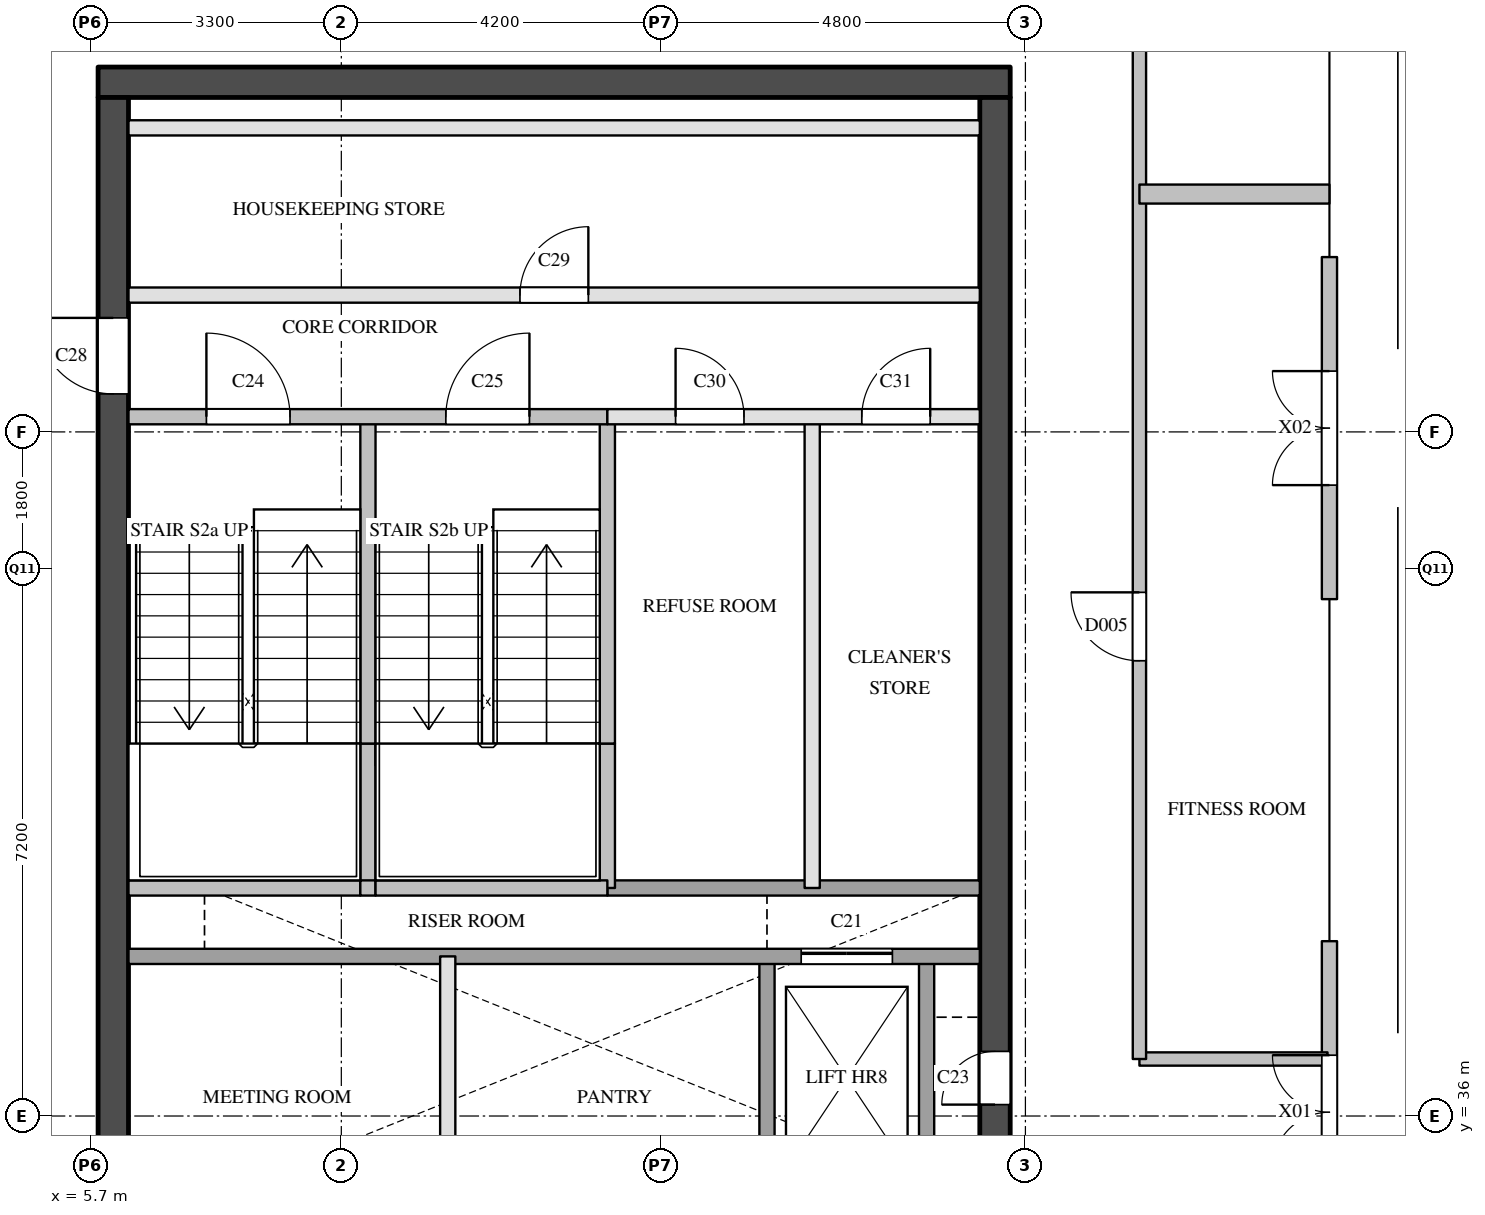
"""IFC4 building model, lengths in metres.
Left out: names, types, materials, properties, quantities, classifications, styles, units other than length and angle.
Written with IfcOpenShell. Run it as: python <this file> out.ifc"""

import sys

from ifc_helpers import new_model, si_unit, direction, frame, frame_2d, origin, place, context, subcontext, project, spatial, rectangle, extrude, element, fill, save


model = new_model("IFC4")
c1 = context("Model", 3, precision=1e-05, world=origin(), true_north=direction((0.0, 1.0)))
c2 = subcontext(c1, "Body", "Model", "MODEL_VIEW")
j1 = project(units=[si_unit("LENGTHUNIT", "METRE"), si_unit("PLANEANGLEUNIT", "RADIAN")], contexts=[c1])
p1 = place(None, origin())
s1 = spatial("IfcSite", under=j1, at=p1, CompositionType="ELEMENT")
p2 = place(p1, origin())
s2 = spatial("IfcBuilding", under=s1, at=p2, CompositionType="ELEMENT")
p3 = place(p2, frame((0.0, 0.0, 203.3)))
s3 = spatial("IfcBuildingStorey", under=s2, at=p3, CompositionType="ELEMENT", Elevation=203.3)
p4 = place(p3, frame((22.0, 33.8, 0.0), z_axis=(0.0, 0.0, 1.0), x_axis=(0.0, 1.0, 0.0)))
e1 = element("IfcWall", 1, at=p4, inside=s3, PredefinedType="SOLIDWALL", context=c2, shape_type="SweptSolid", body=[
    extrude(rectangle(XDim=4.5, YDim=0.2, at=frame_2d((2.25, 0.0))), origin(), (0.0, 0.0, 1.0), 2.6),
])
p5 = place(p4, frame((1.5, 0.0, 0.0)))
e2 = element("IfcOpeningElement", 2, at=p5, cuts=e1, PredefinedType="OPENING", context=c2, shape_type="SweptSolid", body=[
    extrude(rectangle(XDim=1.5, YDim=2.1, at=frame_2d((0.75, 1.05))), frame((0.0, 0.11, 0.0), z_axis=(0.0, -1.0, 0.0), x_axis=(1.0, 0.0, 0.0)), (0.0, 0.0, 1.0), 0.22),
])
p6 = place(p3, frame((22.0, 42.8, 0.0), z_axis=(0.0, 0.0, 1.0), x_axis=(0.0, 1.0, 0.0)))
e3 = element("IfcWall", 3, at=p6, inside=s3, PredefinedType="SOLIDWALL", context=c2, shape_type="SweptSolid", body=[
    extrude(rectangle(XDim=4.5, YDim=0.2, at=frame_2d((2.25, 0.0))), origin(), (0.0, 0.0, 1.0), 2.6),
])
p7 = place(p6, frame((1.5, 0.0, 0.0)))
e4 = element("IfcOpeningElement", 4, at=p7, cuts=e3, PredefinedType="OPENING", context=c2, shape_type="SweptSolid", body=[
    extrude(rectangle(XDim=1.5, YDim=2.1, at=frame_2d((0.75, 1.05))), frame((0.0, 0.11, 0.0), z_axis=(0.0, -1.0, 0.0), x_axis=(1.0, 0.0, 0.0)), (0.0, 0.0, 1.0), 0.22),
])
p8 = place(p3, frame((5.8, 49.6, 0.0), z_axis=(0.0, 0.0, 1.0), x_axis=(1.0, 0.0, 0.0)))
e5 = element("IfcWall", 5, at=p8, inside=s3, PredefinedType="SHEAR", context=c2, shape_type="SweptSolid", body=[
    extrude(rectangle(XDim=12.0, YDim=0.4, at=frame_2d((6.0, 0.0))), origin(), (0.0, 0.0, 1.0), 3.6),
])
p9 = place(p3, frame((6.0, 29.1, 0.0), z_axis=(0.0, 0.0, 1.0), x_axis=(0.0, 1.0, 0.0)))
e6 = element("IfcWall", 6, at=p9, inside=s3, PredefinedType="SHEAR", context=c2, shape_type="SweptSolid", body=[
    extrude(rectangle(XDim=20.3, YDim=0.4, at=frame_2d((10.15, 0.0))), origin(), (0.0, 0.0, 1.0), 3.6),
])
p10 = place(p9, frame((3.45, 0.0, 0.0)))
e7 = element("IfcOpeningElement", 7, at=p10, cuts=e6, PredefinedType="OPENING", context=c2, shape_type="SweptSolid", body=[
    extrude(rectangle(XDim=1.0, YDim=2.1, at=frame_2d((0.5, 1.05))), frame((0.0, 0.21, 0.0), z_axis=(0.0, -1.0, 0.0), x_axis=(1.0, 0.0, 0.0)), (0.0, 0.0, 1.0), 0.42),
])
p11 = place(p9, frame((16.4, 0.0, 0.0)))
e8 = element("IfcOpeningElement", 8, at=p11, cuts=e6, PredefinedType="OPENING", context=c2, shape_type="SweptSolid", body=[
    extrude(rectangle(XDim=1.0, YDim=2.1, at=frame_2d((0.5, 1.05))), frame((0.0, 0.21, 0.0), z_axis=(0.0, -1.0, 0.0), x_axis=(1.0, 0.0, 0.0)), (0.0, 0.0, 1.0), 0.42),
])
p12 = place(p3, frame((17.6, 29.1, 0.0), z_axis=(0.0, 0.0, 1.0), x_axis=(0.0, 1.0, 0.0)))
e9 = element("IfcWall", 9, at=p12, inside=s3, PredefinedType="SHEAR", context=c2, shape_type="SweptSolid", body=[
    extrude(rectangle(XDim=20.3, YDim=0.4, at=frame_2d((10.15, 0.0))), origin(), (0.0, 0.0, 1.0), 3.6),
])
p13 = place(p12, frame((1.25, 0.0, 0.0)))
e10 = element("IfcOpeningElement", 10, at=p13, cuts=e9, PredefinedType="OPENING", context=c2, shape_type="SweptSolid", body=[
    extrude(rectangle(XDim=0.7, YDim=2.1, at=frame_2d((0.35, 1.05))), frame((0.0, 0.21, 0.0), z_axis=(0.0, -1.0, 0.0), x_axis=(1.0, 0.0, 0.0)), (0.0, 0.0, 1.0), 0.42),
])
p14 = place(p12, frame((7.05, 0.0, 0.0)))
e11 = element("IfcOpeningElement", 11, at=p14, cuts=e9, PredefinedType="OPENING", context=c2, shape_type="SweptSolid", body=[
    extrude(rectangle(XDim=0.7, YDim=2.1, at=frame_2d((0.35, 1.05))), frame((0.0, 0.21, 0.0), z_axis=(0.0, -1.0, 0.0), x_axis=(1.0, 0.0, 0.0)), (0.0, 0.0, 1.0), 0.42),
])
p15 = place(p12, frame((3.6, 0.0, 0.0)))
e12 = element("IfcOpeningElement", 12, at=p15, cuts=e9, PredefinedType="OPENING", context=c2, shape_type="SweptSolid", body=[
    extrude(rectangle(XDim=1.8, YDim=2.1, at=frame_2d((0.9, 1.05))), frame((0.0, 0.21, 0.0), z_axis=(0.0, -1.0, 0.0), x_axis=(1.0, 0.0, 0.0)), (0.0, 0.0, 1.0), 0.42),
])
p16 = place(p3, frame((9.35, 39.0, 0.0), z_axis=(0.0, 0.0, 1.0), x_axis=(0.0, 1.0, 0.0)))
e13 = element("IfcWall", 13, at=p16, inside=s3, PredefinedType="SOLIDWALL", context=c2, shape_type="SweptSolid", body=[
    extrude(rectangle(XDim=1.9, YDim=0.2, at=frame_2d((0.95, 0.0))), origin(), (0.0, 0.0, 1.0), 3.6),
])
p17 = place(p3, frame((9.35, 40.9, 0.0), z_axis=(0.0, 0.0, 1.0), x_axis=(0.0, 1.0, 0.0)))
e14 = element("IfcWall", 14, at=p17, inside=s3, PredefinedType="SOLIDWALL", context=c2, shape_type="SweptSolid", body=[
    extrude(rectangle(XDim=4.3, YDim=0.2, at=frame_2d((2.15, 0.0))), origin(), (0.0, 0.0, 1.0), 3.6),
])
p18 = place(p3, frame((10.4, 33.8, 0.0), z_axis=(0.0, 0.0, 1.0), x_axis=(0.0, 1.0, 0.0)))
e15 = element("IfcWall", 15, at=p18, inside=s3, PredefinedType="PARTITIONING", context=c2, shape_type="SweptSolid", body=[
    extrude(rectangle(XDim=4.3, YDim=0.2, at=frame_2d((2.15, 0.0))), origin(), (0.0, 0.0, 1.0), 3.6),
])
p19 = place(p3, frame((12.5, 39.0, 0.0), z_axis=(0.0, 0.0, 1.0), x_axis=(0.0, 1.0, 0.0)))
e16 = element("IfcWall", 16, at=p19, inside=s3, PredefinedType="SOLIDWALL", context=c2, shape_type="SweptSolid", body=[
    extrude(rectangle(XDim=1.9, YDim=0.2, at=frame_2d((0.95, 0.0))), origin(), (0.0, 0.0, 1.0), 3.6),
])
p20 = place(p3, frame((12.5, 40.9, 0.0), z_axis=(0.0, 0.0, 1.0), x_axis=(0.0, 1.0, 0.0)))
e17 = element("IfcWall", 17, at=p20, inside=s3, PredefinedType="SOLIDWALL", context=c2, shape_type="SweptSolid", body=[
    extrude(rectangle(XDim=4.3, YDim=0.2, at=frame_2d((2.15, 0.0))), origin(), (0.0, 0.0, 1.0), 3.6),
])
p21 = place(p3, frame((14.6, 34.9, 0.0), z_axis=(0.0, 0.0, 1.0), x_axis=(0.0, 1.0, 0.0)))
e18 = element("IfcWall", 18, at=p21, inside=s3, PredefinedType="SOLIDWALL", context=c2, shape_type="SweptSolid", body=[
    extrude(rectangle(XDim=3.2, YDim=0.2, at=frame_2d((1.6, 0.0))), origin(), (0.0, 0.0, 1.0), 3.6),
])
p22 = place(p3, frame((15.195, 39.0, 0.0), z_axis=(0.0, 0.0, 1.0), x_axis=(0.0, 1.0, 0.0)))
e19 = element("IfcWall", 19, at=p22, inside=s3, PredefinedType="PARTITIONING", context=c2, shape_type="SweptSolid", body=[
    extrude(rectangle(XDim=6.2, YDim=0.2, at=frame_2d((3.1, 0.0))), origin(), (0.0, 0.0, 1.0), 3.6),
])
p23 = place(p3, frame((16.7, 34.9, 0.0), z_axis=(0.0, 0.0, 1.0), x_axis=(0.0, 1.0, 0.0)))
e20 = element("IfcWall", 20, at=p23, inside=s3, PredefinedType="SOLIDWALL", context=c2, shape_type="SweptSolid", body=[
    extrude(rectangle(XDim=3.2, YDim=0.2, at=frame_2d((1.6, 0.0))), origin(), (0.0, 0.0, 1.0), 3.6),
])
p24 = place(p3, frame((6.2, 38.1, 0.0), z_axis=(0.0, 0.0, 1.0), x_axis=(1.0, 0.0, 0.0)))
e21 = element("IfcWall", 21, at=p24, inside=s3, PredefinedType="SOLIDWALL", context=c2, shape_type="SweptSolid", body=[
    extrude(rectangle(XDim=11.2, YDim=0.2, at=frame_2d((5.6, 0.0))), origin(), (0.0, 0.0, 1.0), 3.6),
])
p25 = place(p24, frame((8.85, 0.0, 0.0)))
e22 = element("IfcOpeningElement", 22, at=p25, cuts=e21, PredefinedType="OPENING", context=c2, shape_type="SweptSolid", body=[
    extrude(rectangle(XDim=1.2, YDim=2.1, at=frame_2d((0.6, 1.05))), frame((0.0, 0.11, 0.0), z_axis=(0.0, -1.0, 0.0), x_axis=(1.0, 0.0, 0.0)), (0.0, 0.0, 1.0), 0.22),
])
p26 = place(p3, frame((12.5, 39.0, 0.0), z_axis=(0.0, 0.0, 1.0), x_axis=(1.0, 0.0, 0.0)))
e23 = element("IfcWall", 23, at=p26, inside=s3, PredefinedType="SOLIDWALL", context=c2, shape_type="SweptSolid", body=[
    extrude(rectangle(XDim=4.9, YDim=0.2, at=frame_2d((2.45, 0.0))), origin(), (0.0, 0.0, 1.0), 3.6),
])
p27 = place(p3, frame((6.2, 39.0, 0.0), z_axis=(0.0, 0.0, 1.0), x_axis=(1.0, 0.0, 0.0)))
e24 = element("IfcWall", 24, at=p27, inside=s3, PredefinedType="SOLIDWALL", context=c2, shape_type="SweptSolid", body=[
    extrude(rectangle(XDim=3.05, YDim=0.2, at=frame_2d((1.525, 0.0))), origin(), (0.0, 0.0, 1.0), 3.6),
])
p28 = place(p3, frame((9.25, 39.0, 0.0), z_axis=(0.0, 0.0, 1.0), x_axis=(1.0, 0.0, 0.0)))
e25 = element("IfcWall", 25, at=p28, inside=s3, PredefinedType="SOLIDWALL", context=c2, shape_type="SweptSolid", body=[
    extrude(rectangle(XDim=0.2, YDim=0.2, at=frame_2d((0.1, 0.0))), origin(), (0.0, 0.0, 1.0), 3.6),
])
p29 = place(p3, frame((9.45, 39.0, 0.0), z_axis=(0.0, 0.0, 1.0), x_axis=(1.0, 0.0, 0.0)))
e26 = element("IfcWall", 26, at=p29, inside=s3, PredefinedType="SOLIDWALL", context=c2, shape_type="SweptSolid", body=[
    extrude(rectangle(XDim=3.05, YDim=0.2, at=frame_2d((1.525, 0.0))), origin(), (0.0, 0.0, 1.0), 3.6),
])
p30 = place(p3, frame((12.5, 45.2, 0.0), z_axis=(0.0, 0.0, 1.0), x_axis=(1.0, 0.0, 0.0)))
e27 = element("IfcWall", 27, at=p30, inside=s3, PredefinedType="PARTITIONING", context=c2, shape_type="SweptSolid", body=[
    extrude(rectangle(XDim=4.9, YDim=0.2, at=frame_2d((2.45, 0.0))), origin(), (0.0, 0.0, 1.0), 3.6),
])
p31 = place(p30, frame((0.897, 0.0, 0.0)))
e28 = element("IfcOpeningElement", 28, at=p31, cuts=e27, PredefinedType="OPENING", context=c2, shape_type="SweptSolid", body=[
    extrude(rectangle(XDim=0.9, YDim=2.1, at=frame_2d((0.45, 1.05))), frame((0.0, 0.11, 0.0), z_axis=(0.0, -1.0, 0.0), x_axis=(1.0, 0.0, 0.0)), (0.0, 0.0, 1.0), 0.22),
])
p32 = place(p30, frame((3.347, 0.0, 0.0)))
e29 = element("IfcOpeningElement", 29, at=p32, cuts=e27, PredefinedType="OPENING", context=c2, shape_type="SweptSolid", body=[
    extrude(rectangle(XDim=0.9, YDim=2.1, at=frame_2d((0.45, 1.05))), frame((0.0, 0.11, 0.0), z_axis=(0.0, -1.0, 0.0), x_axis=(1.0, 0.0, 0.0)), (0.0, 0.0, 1.0), 0.22),
])
p33 = place(p3, frame((6.2, 45.2, 0.0), z_axis=(0.0, 0.0, 1.0), x_axis=(1.0, 0.0, 0.0)))
e30 = element("IfcWall", 30, at=p33, inside=s3, PredefinedType="SOLIDWALL", context=c2, shape_type="SweptSolid", body=[
    extrude(rectangle(XDim=6.3, YDim=0.2, at=frame_2d((3.15, 0.0))), origin(), (0.0, 0.0, 1.0), 3.6),
])
p34 = place(p33, frame((1.025, 0.0, 0.0)))
e31 = element("IfcOpeningElement", 31, at=p34, cuts=e30, PredefinedType="OPENING", context=c2, shape_type="SweptSolid", body=[
    extrude(rectangle(XDim=1.1, YDim=2.1, at=frame_2d((0.55, 1.05))), frame((0.0, 0.11, 0.0), z_axis=(0.0, -1.0, 0.0), x_axis=(1.0, 0.0, 0.0)), (0.0, 0.0, 1.0), 0.22),
])
p35 = place(p33, frame((4.175, 0.0, 0.0)))
e32 = element("IfcOpeningElement", 32, at=p35, cuts=e30, PredefinedType="OPENING", context=c2, shape_type="SweptSolid", body=[
    extrude(rectangle(XDim=1.1, YDim=2.1, at=frame_2d((0.55, 1.05))), frame((0.0, 0.11, 0.0), z_axis=(0.0, -1.0, 0.0), x_axis=(1.0, 0.0, 0.0)), (0.0, 0.0, 1.0), 0.22),
])
p36 = place(p3, frame((6.2, 46.8, 0.0), z_axis=(0.0, 0.0, 1.0), x_axis=(1.0, 0.0, 0.0)))
e33 = element("IfcWall", 33, at=p36, inside=s3, PredefinedType="PARTITIONING", context=c2, shape_type="SweptSolid", body=[
    extrude(rectangle(XDim=11.2, YDim=0.2, at=frame_2d((5.6, 0.0))), origin(), (0.0, 0.0, 1.0), 3.6),
])
p37 = place(p36, frame((5.15, 0.0, 0.0)))
e34 = element("IfcOpeningElement", 34, at=p37, cuts=e33, PredefinedType="OPENING", context=c2, shape_type="SweptSolid", body=[
    extrude(rectangle(XDim=0.9, YDim=2.1, at=frame_2d((0.45, 1.05))), frame((0.0, 0.11, 0.0), z_axis=(0.0, -1.0, 0.0), x_axis=(1.0, 0.0, 0.0)), (0.0, 0.0, 1.0), 0.22),
])
p38 = place(p3, frame((6.2, 49.0, 0.0), z_axis=(0.0, 0.0, 1.0), x_axis=(1.0, 0.0, 0.0)))
e35 = element("IfcWall", 35, at=p38, inside=s3, PredefinedType="PARTITIONING", context=c2, shape_type="SweptSolid", body=[
    extrude(rectangle(XDim=11.2, YDim=0.2, at=frame_2d((5.6, 0.0))), origin(), (0.0, 0.0, 1.0), 3.6),
])
p39 = place(p3, frame((19.5, 36.75, 0.0), z_axis=(0.0, 0.0, 1.0), x_axis=(1.0, 0.0, 0.0)))
e36 = element("IfcWall", 36, at=p39, inside=s3, PredefinedType="PARTITIONING", context=c2, shape_type="SweptSolid", body=[
    extrude(rectangle(XDim=2.475, YDim=0.175, at=frame_2d((1.237, 0.0))), origin(), (0.0, 0.0, 1.0), 3.6),
])
p40 = place(p3, frame((19.5, 36.75, 0.0), z_axis=(0.0, 0.0, 1.0), x_axis=(0.0, 1.0, 0.0)))
e37 = element("IfcWall", 37, at=p40, inside=s3, PredefinedType="PARTITIONING", context=c2, shape_type="SweptSolid", body=[
    extrude(rectangle(XDim=14.75, YDim=0.175, at=frame_2d((7.375, 0.0))), origin(), (0.0, 0.0, 1.0), 3.6),
])
p41 = place(p40, frame((5.239, 0.0, 0.0)))
e38 = element("IfcOpeningElement", 38, at=p41, cuts=e37, PredefinedType="OPENING", context=c2, shape_type="SweptSolid", body=[
    extrude(rectangle(XDim=0.9, YDim=2.1, at=frame_2d((0.45, 1.05))), frame((0.0, 0.097, 0.0), z_axis=(0.0, -1.0, 0.0), x_axis=(1.0, 0.0, 0.0)), (0.0, 0.0, 1.0), 0.195),
])
p42 = place(p3, frame((19.5, 48.129, 0.0), z_axis=(0.0, 0.0, 1.0), x_axis=(1.0, 0.0, 0.0)))
e39 = element("IfcWall", 39, at=p42, inside=s3, PredefinedType="PARTITIONING", context=c2, shape_type="SweptSolid", body=[
    extrude(rectangle(XDim=2.5, YDim=0.25, at=frame_2d((1.25, 0.0))), origin(), (0.0, 0.0, 1.0), 3.6),
])
p43 = place(p5, origin())
e40 = element("IfcDoor", 40, at=p43, inside=s3, OperationType="DOUBLE_DOOR_SINGLE_SWING", PredefinedType="DOOR", context=c2, shape_type="SweptSolid", body=[
    extrude(rectangle(XDim=1.5, YDim=2.1, at=frame_2d((0.75, 1.05))), frame((0.0, 0.025, 0.0), z_axis=(0.0, -1.0, 0.0), x_axis=(1.0, 0.0, 0.0)), (0.0, 0.0, 1.0), 0.05),
])
fill(e2, e40)
p44 = place(p7, origin())
e41 = element("IfcDoor", 41, at=p44, inside=s3, OperationType="DOUBLE_DOOR_SINGLE_SWING", PredefinedType="DOOR", context=c2, shape_type="SweptSolid", body=[
    extrude(rectangle(XDim=1.5, YDim=2.1, at=frame_2d((0.75, 1.05))), frame((0.0, 0.025, 0.0), z_axis=(0.0, -1.0, 0.0), x_axis=(1.0, 0.0, 0.0)), (0.0, 0.0, 1.0), 0.05),
])
fill(e4, e41)
p45 = place(p25, origin())
e42 = element("IfcDoor", 42, at=p45, inside=s3, OperationType="SLIDING_TO_LEFT", PredefinedType="DOOR", context=c2, shape_type="SweptSolid", body=[
    extrude(rectangle(XDim=1.2, YDim=2.1, at=frame_2d((0.6, 1.05))), frame((0.0, 0.025, 0.0), z_axis=(0.0, -1.0, 0.0), x_axis=(1.0, 0.0, 0.0)), (0.0, 0.0, 1.0), 0.05),
])
fill(e22, e42)
p46 = place(p14, origin())
e43 = element("IfcDoor", 43, at=p46, inside=s3, OperationType="SINGLE_SWING_LEFT", PredefinedType="DOOR", context=c2, shape_type="SweptSolid", body=[
    extrude(rectangle(XDim=0.7, YDim=2.1, at=frame_2d((0.35, 1.05))), frame((0.0, 0.025, 0.0), z_axis=(0.0, -1.0, 0.0), x_axis=(1.0, 0.0, 0.0)), (0.0, 0.0, 1.0), 0.05),
])
fill(e11, e43)
p47 = place(p34, origin())
e44 = element("IfcDoor", 44, at=p47, inside=s3, OperationType="SINGLE_SWING_LEFT", PredefinedType="DOOR", context=c2, shape_type="SweptSolid", body=[
    extrude(rectangle(XDim=1.1, YDim=2.1, at=frame_2d((0.55, 1.05))), frame((0.0, 0.025, 0.0), z_axis=(0.0, -1.0, 0.0), x_axis=(1.0, 0.0, 0.0)), (0.0, 0.0, 1.0), 0.05),
])
fill(e31, e44)
p48 = place(p35, origin())
e45 = element("IfcDoor", 45, at=p48, inside=s3, OperationType="SINGLE_SWING_RIGHT", PredefinedType="DOOR", context=c2, shape_type="SweptSolid", body=[
    extrude(rectangle(XDim=1.1, YDim=2.1, at=frame_2d((0.55, 1.05))), frame((0.0, 0.025, 0.0), z_axis=(0.0, -1.0, 0.0), x_axis=(1.0, 0.0, 0.0)), (0.0, 0.0, 1.0), 0.05),
])
fill(e32, e45)
p49 = place(p11, origin())
e46 = element("IfcDoor", 46, at=p49, inside=s3, OperationType="SINGLE_SWING_RIGHT", PredefinedType="DOOR", context=c2, shape_type="SweptSolid", body=[
    extrude(rectangle(XDim=1.0, YDim=2.1, at=frame_2d((0.5, 1.05))), frame((0.0, 0.025, 0.0), z_axis=(0.0, -1.0, 0.0), x_axis=(1.0, 0.0, 0.0)), (0.0, 0.0, 1.0), 0.05),
])
fill(e8, e46)
p50 = place(p37, origin())
e47 = element("IfcDoor", 47, at=p50, inside=s3, OperationType="SINGLE_SWING_RIGHT", PredefinedType="DOOR", context=c2, shape_type="SweptSolid", body=[
    extrude(rectangle(XDim=0.9, YDim=2.1, at=frame_2d((0.45, 1.05))), frame((0.0, 0.025, 0.0), z_axis=(0.0, -1.0, 0.0), x_axis=(1.0, 0.0, 0.0)), (0.0, 0.0, 1.0), 0.05),
])
fill(e34, e47)
p51 = place(p31, origin())
e48 = element("IfcDoor", 48, at=p51, inside=s3, OperationType="SINGLE_SWING_LEFT", PredefinedType="DOOR", context=c2, shape_type="SweptSolid", body=[
    extrude(rectangle(XDim=0.9, YDim=2.1, at=frame_2d((0.45, 1.05))), frame((0.0, 0.025, 0.0), z_axis=(0.0, -1.0, 0.0), x_axis=(1.0, 0.0, 0.0)), (0.0, 0.0, 1.0), 0.05),
])
fill(e28, e48)
p52 = place(p32, origin())
e49 = element("IfcDoor", 49, at=p52, inside=s3, OperationType="SINGLE_SWING_RIGHT", PredefinedType="DOOR", context=c2, shape_type="SweptSolid", body=[
    extrude(rectangle(XDim=0.9, YDim=2.1, at=frame_2d((0.45, 1.05))), frame((0.0, 0.025, 0.0), z_axis=(0.0, -1.0, 0.0), x_axis=(1.0, 0.0, 0.0)), (0.0, 0.0, 1.0), 0.05),
])
fill(e29, e49)
p53 = place(p41, origin())
e50 = element("IfcDoor", 50, at=p53, inside=s3, OperationType="SINGLE_SWING_RIGHT", PredefinedType="DOOR", context=c2, shape_type="SweptSolid", body=[
    extrude(rectangle(XDim=0.9, YDim=2.1, at=frame_2d((0.45, 1.05))), frame((0.0, 0.025, 0.0), z_axis=(0.0, -1.0, 0.0), x_axis=(1.0, 0.0, 0.0)), (0.0, 0.0, 1.0), 0.05),
])
fill(e38, e50)
save(model, sys.argv[1])
